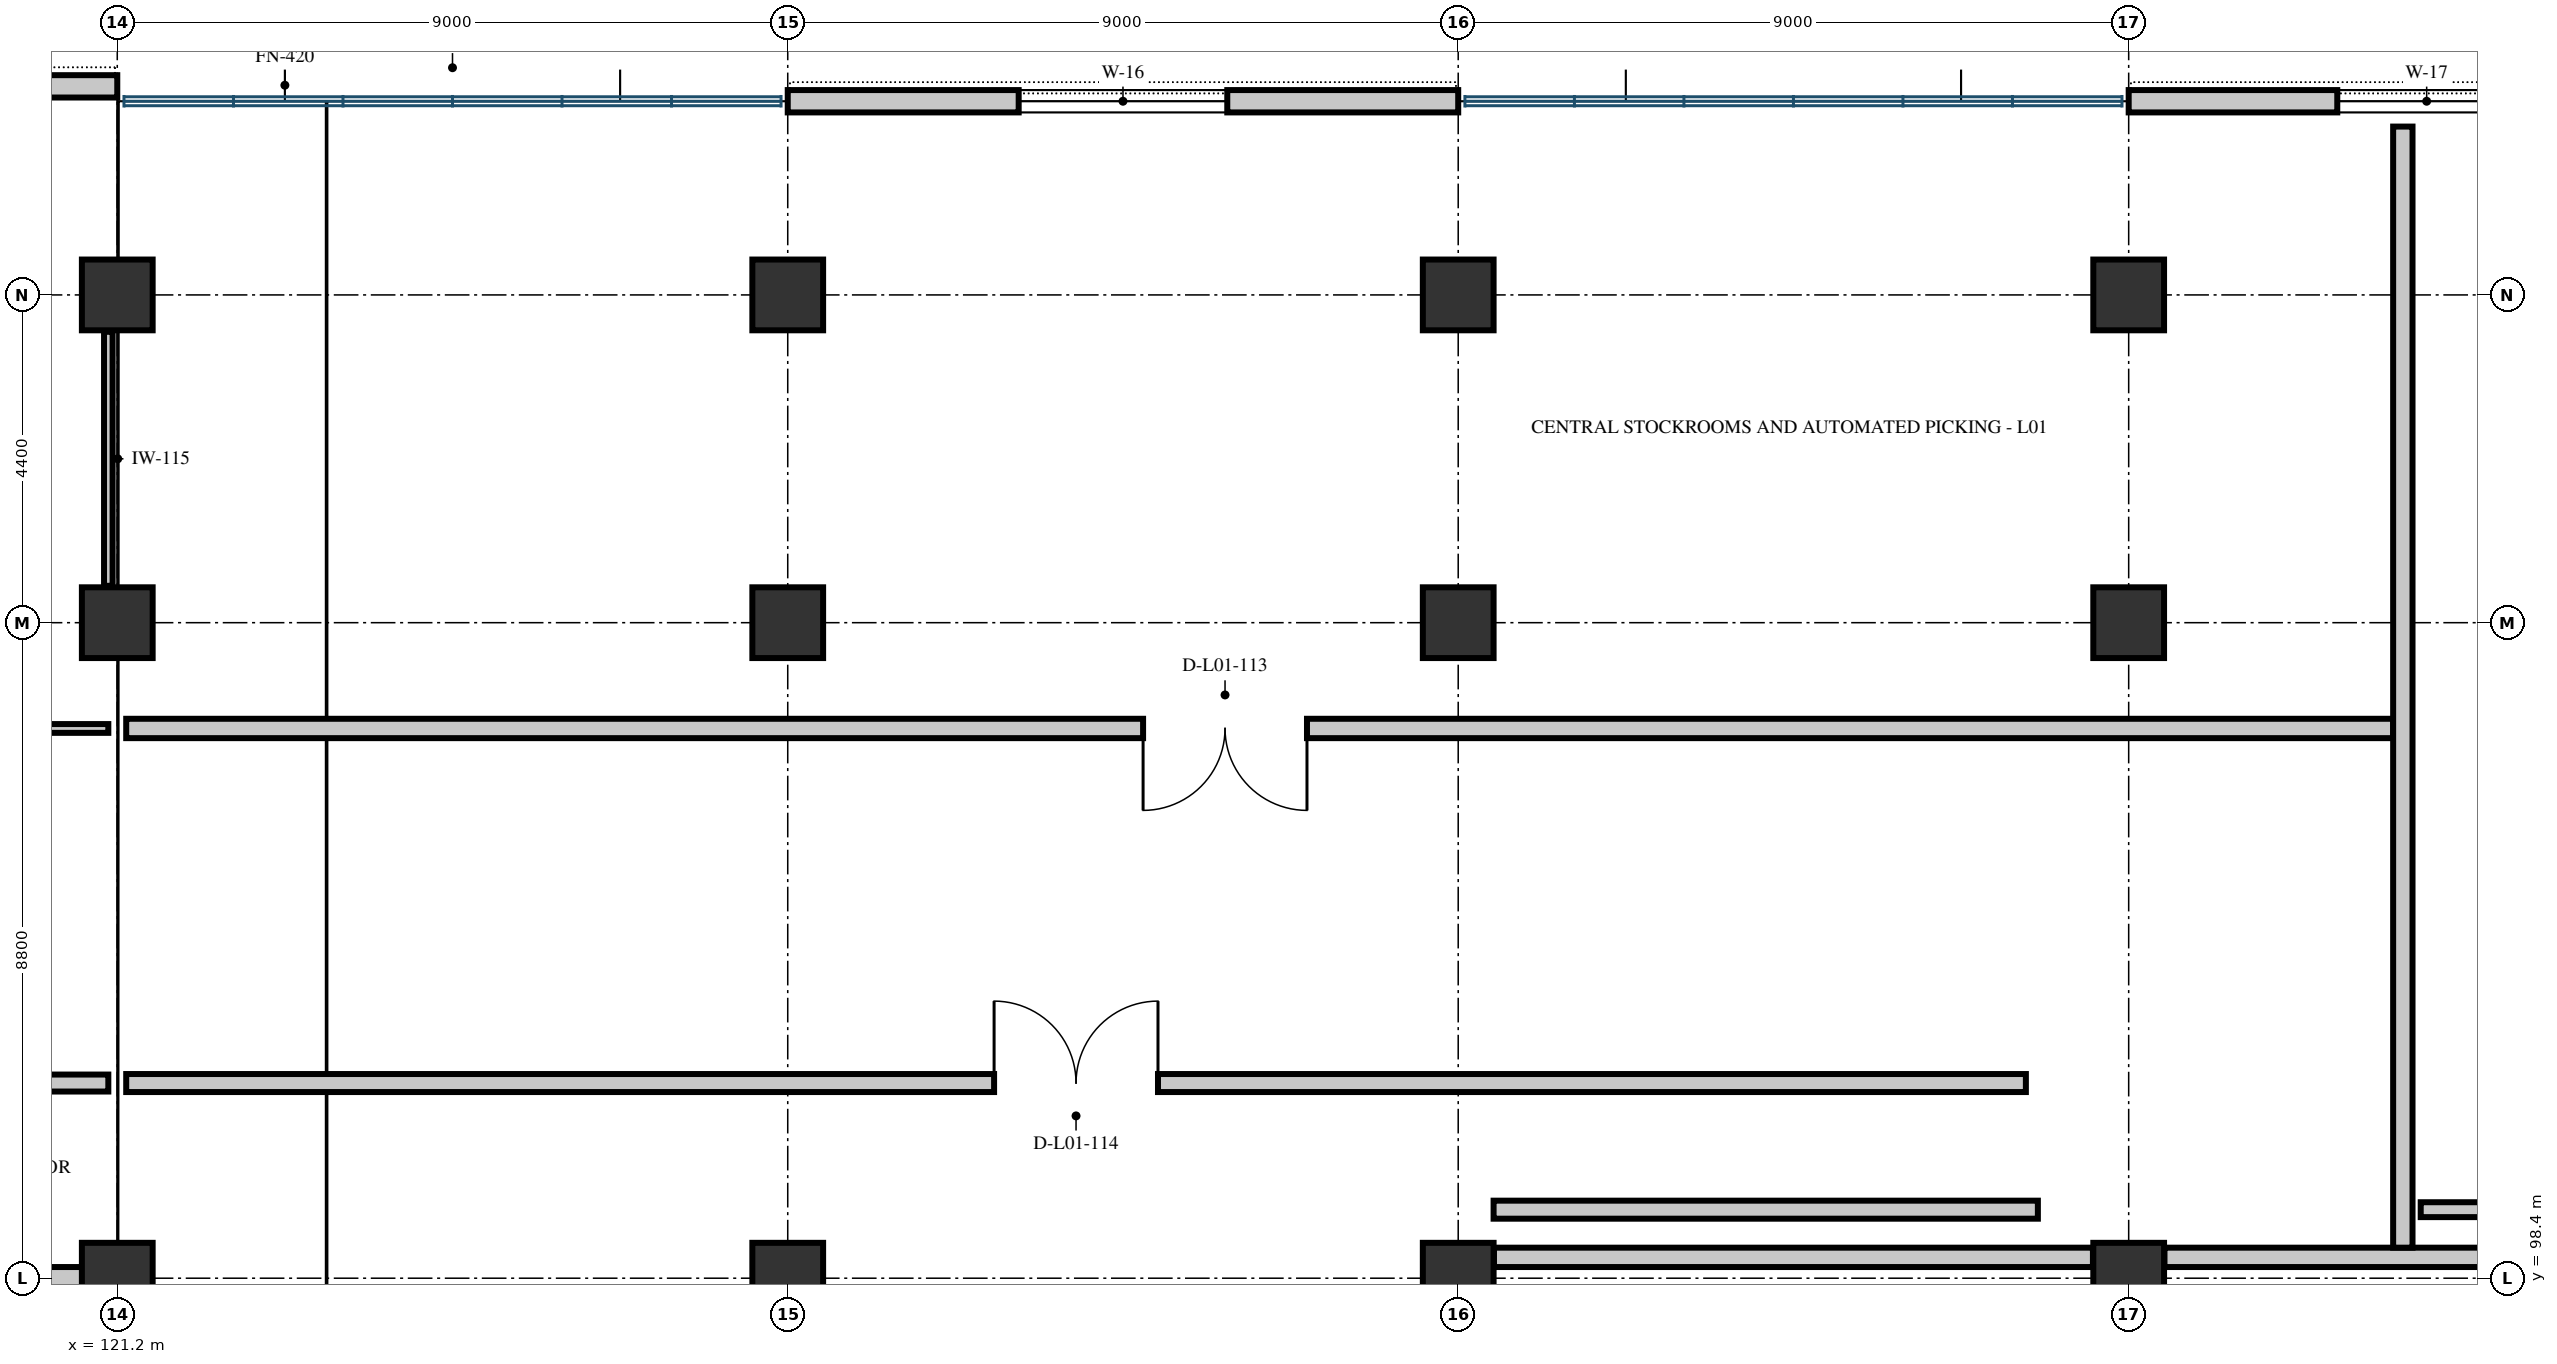
"""IFC4 building model, lengths in metres.
Left out: names, types, materials, properties, quantities, classifications, styles, units other than length and angle.
Written with IfcOpenShell. Run it as: python <this file> out.ifc"""

import sys

from ifc_helpers import new_model, si_unit, direction, frame, frame_2d, origin, origin_2d, place, context, subcontext, project, spatial, rectangle, extrude, element, fill, save


model = new_model("IFC4")
c1 = context("Model", 3, precision=1e-05, world=origin(), true_north=direction((0.0, 1.0)))
c2 = subcontext(c1, "Body", "Model", "MODEL_VIEW")
j1 = project(units=[si_unit("LENGTHUNIT", "METRE"), si_unit("PLANEANGLEUNIT", "RADIAN")], contexts=[c1])
p1 = place(None, origin())
s1 = spatial("IfcSite", under=j1, at=p1, CompositionType="ELEMENT")
p2 = place(p1, origin())
s2 = spatial("IfcBuilding", under=s1, at=p2, CompositionType="ELEMENT")
p3 = place(p2, frame((0.0, 0.0, 5.4)))
s3 = spatial("IfcBuildingStorey", under=s2, at=p3, CompositionType="ELEMENT", Elevation=5.4)
for number, where, z_axis, x_axis in (
    (1, (121.2, 98.4, 0.0), (0.0, 0.0, 1.0), (1.0, 0.0, 0.0)),
    (2, (121.2, 107.2, 0.0), (0.0, 0.0, 1.0), (1.0, 0.0, 0.0)),
    (3, (121.2, 111.6, 0.0), (0.0, 0.0, 1.0), (1.0, 0.0, 0.0)),
    (4, (130.2, 98.4, 0.0), (0.0, 0.0, 1.0), (1.0, 0.0, 0.0)),
    (5, (130.2, 107.2, 0.0), (0.0, 0.0, 1.0), (1.0, 0.0, 0.0)),
    (6, (130.2, 111.6, 0.0), (0.0, 0.0, 1.0), (1.0, 0.0, 0.0)),
    (7, (139.2, 98.4, 0.0), (0.0, 0.0, 1.0), (1.0, 0.0, 0.0)),
    (8, (139.2, 107.2, 0.0), (0.0, 0.0, 1.0), (1.0, 0.0, 0.0)),
    (9, (139.2, 111.6, 0.0), (0.0, 0.0, 1.0), (1.0, 0.0, 0.0)),
    (10, (148.2, 98.4, 0.0), (0.0, 0.0, 1.0), (1.0, 0.0, 0.0)),
    (11, (148.2, 107.2, 0.0), (0.0, 0.0, 1.0), (1.0, 0.0, 0.0)),
    (12, (148.2, 111.6, 0.0), (0.0, 0.0, 1.0), (1.0, 0.0, 0.0)),
):
    element("IfcColumn", number, at=place(p3, frame(where, z_axis=z_axis, x_axis=x_axis)), inside=s3, PredefinedType="COLUMN", context=c2, shape_type="SweptSolid", body=[
        extrude(rectangle(XDim=0.95, YDim=0.95, at=origin_2d()), origin(), (0.0, 0.0, 1.0), 4.8),
    ])
p4 = place(p3, frame((112.2, 114.4, 0.0), z_axis=(0.0, 0.0, 1.0), x_axis=(1.0, 0.0, 0.0)))
e13 = element("IfcWall", 13, at=p4, inside=s3, PredefinedType="SOLIDWALL", context=c2, shape_type="SweptSolid", body=[
    extrude(rectangle(XDim=9.0, YDim=0.3, at=frame_2d((4.5, 0.0))), origin(), (0.0, 0.0, 1.0), 4.505),
])
p5 = place(p4, frame((2.9, 0.0, 2.1)))
e14 = element("IfcOpeningElement", 14, at=p5, cuts=e13, PredefinedType="OPENING", context=c2, shape_type="SweptSolid", body=[
    extrude(rectangle(XDim=3.2, YDim=1.4, at=frame_2d((1.6, 0.7))), frame((0.0, 0.162, 0.0), z_axis=(0.0, -1.0, 0.0), x_axis=(1.0, 0.0, 0.0)), (0.0, 0.0, 1.0), 0.324),
])
p6 = place(p3, frame((130.2, 114.2, 0.0), z_axis=(0.0, 0.0, 1.0), x_axis=(1.0, 0.0, 0.0)))
e15 = element("IfcWall", 15, at=p6, inside=s3, PredefinedType="SOLIDWALL", context=c2, shape_type="SweptSolid", body=[
    extrude(rectangle(XDim=9.0, YDim=0.3, at=frame_2d((4.5, 0.0))), origin(), (0.0, 0.0, 1.0), 4.505),
])
p7 = place(p6, frame((3.1, 0.0, 2.15)))
e16 = element("IfcOpeningElement", 16, at=p7, cuts=e15, PredefinedType="OPENING", context=c2, shape_type="SweptSolid", body=[
    extrude(rectangle(XDim=2.8, YDim=1.3, at=frame_2d((1.4, 0.65))), frame((0.0, 0.162, 0.0), z_axis=(0.0, -1.0, 0.0), x_axis=(1.0, 0.0, 0.0)), (0.0, 0.0, 1.0), 0.324),
])
p8 = place(p3, frame((148.2, 114.2, 0.0), z_axis=(0.0, 0.0, 1.0), x_axis=(1.0, 0.0, 0.0)))
e17 = element("IfcWall", 17, at=p8, inside=s3, PredefinedType="SOLIDWALL", context=c2, shape_type="SweptSolid", body=[
    extrude(rectangle(XDim=8.0, YDim=0.3, at=frame_2d((4.0, 0.0))), origin(), (0.0, 0.0, 1.0), 4.505),
])
p9 = place(p8, frame((2.8, 0.0, 2.2)))
e18 = element("IfcOpeningElement", 18, at=p9, cuts=e17, PredefinedType="OPENING", context=c2, shape_type="SweptSolid", body=[
    extrude(rectangle(XDim=2.4, YDim=1.2, at=frame_2d((1.2, 0.6))), frame((0.0, 0.162, 0.0), z_axis=(0.0, -1.0, 0.0), x_axis=(1.0, 0.0, 0.0)), (0.0, 0.0, 1.0), 0.324),
])
p10 = place(p3, frame((120.727, 98.4, 0.0), z_axis=(0.0, 0.0, 1.0), x_axis=(-1.0, 0.0, 0.0)))
e19 = element("IfcWall", 19, at=p10, inside=s3, PredefinedType="SOLIDWALL", context=c2, shape_type="SweptSolid", body=[
    extrude(rectangle(XDim=8.054, YDim=0.3, at=frame_2d((4.027, 0.0))), origin(), (0.0, 0.0, 1.0), 3.445),
])
p11 = place(p10, frame((3.402, 0.0, 1.2)))
e20 = element("IfcOpeningElement", 20, at=p11, cuts=e19, PredefinedType="OPENING", context=c2, shape_type="SweptSolid", body=[
    extrude(rectangle(XDim=1.25, YDim=1.55, at=frame_2d((0.625, 0.775))), frame((0.0, 0.162, 0.0), z_axis=(0.0, -1.0, 0.0), x_axis=(1.0, 0.0, 0.0)), (0.0, 0.0, 1.0), 0.324),
])
for number, where, z_axis, x_axis in (
    (21, (139.68, 98.68, 0.0), (0.0, 0.0, 1.0), (1.0, 0.0, 0.0)),
    (22, (148.68, 98.68, 0.0), (0.0, 0.0, 1.0), (1.0, 0.0, 0.0)),
):
    element("IfcWall", number, at=place(p3, frame(where, z_axis=z_axis, x_axis=x_axis)), inside=s3, PredefinedType="PARTITIONING", context=c2, shape_type="SweptSolid", body=[
        extrude(rectangle(XDim=8.04, YDim=0.26, at=frame_2d((4.02, 0.0))), origin(), (0.0, 0.0, 1.0), 3.445),
    ])
p12 = place(p3, frame((121.08, 105.78, 0.0), z_axis=(0.0, 0.0, 1.0), x_axis=(-1.0, 0.0, 0.0)))
e23 = element("IfcWall", 23, at=p12, inside=s3, PredefinedType="PARTITIONING", context=c2, shape_type="SweptSolid", body=[
    extrude(rectangle(XDim=13.1, YDim=0.118, at=frame_2d((6.55, 0.0))), origin(), (0.0, 0.0, 1.0), 3.445),
])
p13 = place(p3, frame((121.08, 111.105, 0.0), z_axis=(0.0, 0.0, 1.0), x_axis=(0.0, -1.0, 0.0)))
e24 = element("IfcWall", 24, at=p13, inside=s3, PredefinedType="PARTITIONING", context=c2, shape_type="SweptSolid", body=[
    extrude(rectangle(XDim=3.41, YDim=0.115, at=frame_2d((1.705, 0.0))), origin(), (0.0, 0.0, 1.0), 3.445),
])
p14 = place(p3, frame((108.589, 101.02, 0.0), z_axis=(0.0, 0.0, 1.0), x_axis=(1.0, 0.0, 0.0)))
e25 = element("IfcWall", 25, at=p14, inside=s3, PredefinedType="PARTITIONING", context=c2, shape_type="SweptSolid", body=[
    extrude(rectangle(XDim=12.491, YDim=0.228, at=frame_2d((6.246, 0.0))), origin(), (0.0, 0.0, 1.0), 3.445),
])
p15 = place(p3, frame((151.75, 105.78, 0.0), z_axis=(0.0, 0.0, 1.0), x_axis=(-1.0, 0.0, 0.0)))
e26 = element("IfcWall", 26, at=p15, inside=s3, PredefinedType="PARTITIONING", context=c2, shape_type="SweptSolid", body=[
    extrude(rectangle(XDim=30.43, YDim=0.26, at=frame_2d((15.215, 0.0))), origin(), (0.0, 0.0, 1.0), 3.445),
])
p16 = place(p15, frame((14.58, 0.0, 0.0)))
e27 = element("IfcOpeningElement", 27, at=p16, cuts=e26, PredefinedType="OPENING", context=c2, shape_type="SweptSolid", body=[
    extrude(rectangle(XDim=2.2, YDim=2.5, at=frame_2d((1.1, 1.25))), frame((0.0, 0.142, 0.0), z_axis=(0.0, -1.0, 0.0), x_axis=(1.0, 0.0, 0.0)), (0.0, 0.0, 1.0), 0.284),
])
p17 = place(p3, frame((151.88, 113.86, 0.0), z_axis=(0.0, 0.0, 1.0), x_axis=(0.0, -1.0, 0.0)))
e28 = element("IfcWall", 28, at=p17, inside=s3, PredefinedType="PARTITIONING", context=c2, shape_type="SweptSolid", body=[
    extrude(rectangle(XDim=15.05, YDim=0.26, at=frame_2d((7.525, 0.0))), origin(), (0.0, 0.0, 1.0), 3.445),
])
p18 = place(p3, frame((121.32, 101.02, 0.0), z_axis=(0.0, 0.0, 1.0), x_axis=(1.0, 0.0, 0.0)))
e29 = element("IfcWall", 29, at=p18, inside=s3, PredefinedType="PARTITIONING", context=c2, shape_type="SweptSolid", body=[
    extrude(rectangle(XDim=25.5, YDim=0.242, at=frame_2d((12.75, 0.0))), origin(), (0.0, 0.0, 1.0), 3.445),
])
p19 = place(p18, frame((11.65, 0.0, 0.0)))
e30 = element("IfcOpeningElement", 30, at=p19, cuts=e29, PredefinedType="OPENING", context=c2, shape_type="SweptSolid", body=[
    extrude(rectangle(XDim=2.2, YDim=2.5, at=frame_2d((1.1, 1.25))), frame((0.0, 0.133, 0.0), z_axis=(0.0, -1.0, 0.0), x_axis=(1.0, 0.0, 0.0)), (0.0, 0.0, 1.0), 0.266),
])
p20 = place(p3, frame((146.981, 99.32, 0.0), z_axis=(0.0, 0.0, 1.0), x_axis=(-1.0, 0.0, 0.0)))
e31 = element("IfcWall", 31, at=p20, inside=s3, PredefinedType="PARTITIONING", context=c2, shape_type="SweptSolid", body=[
    extrude(rectangle(XDim=7.306, YDim=0.242, at=frame_2d((3.653, 0.0))), origin(), (0.0, 0.0, 1.0), 4.505),
])
p21 = place(p3, frame((156.28, 99.32, 0.0), z_axis=(0.0, 0.0, 1.0), x_axis=(-1.0, 0.0, 0.0)))
e32 = element("IfcWall", 32, at=p21, inside=s3, PredefinedType="PARTITIONING", context=c2, shape_type="SweptSolid", body=[
    extrude(rectangle(XDim=4.16, YDim=0.2, at=frame_2d((2.08, 0.0))), origin(), (0.0, 0.0, 1.0), 4.505),
])
p22 = place(p7, origin())
e33 = element("IfcWindow", 33, at=p22, inside=s3, PartitioningType="SINGLE_PANEL", PredefinedType="WINDOW", context=c2, shape_type="SweptSolid", body=[
    extrude(rectangle(XDim=2.8, YDim=1.3, at=frame_2d((1.4, 0.65))), frame((0.0, 0.03, 0.0), z_axis=(0.0, -1.0, 0.0), x_axis=(1.0, 0.0, 0.0)), (0.0, 0.0, 1.0), 0.06),
])
fill(e16, e33)
p23 = place(p9, origin())
e34 = element("IfcWindow", 34, at=p23, inside=s3, PartitioningType="SINGLE_PANEL", PredefinedType="WINDOW", context=c2, shape_type="SweptSolid", body=[
    extrude(rectangle(XDim=2.4, YDim=1.2, at=frame_2d((1.2, 0.6))), frame((0.0, 0.03, 0.0), z_axis=(0.0, -1.0, 0.0), x_axis=(1.0, 0.0, 0.0)), (0.0, 0.0, 1.0), 0.06),
])
fill(e18, e34)
p24 = place(p16, origin())
e35 = element("IfcDoor", 35, at=p24, inside=s3, OperationType="DOUBLE_DOOR_SINGLE_SWING", PredefinedType="DOOR", context=c2, shape_type="SweptSolid", body=[
    extrude(rectangle(XDim=2.2, YDim=2.5, at=frame_2d((1.1, 1.25))), frame((0.0, 0.025, 0.0), z_axis=(0.0, -1.0, 0.0), x_axis=(1.0, 0.0, 0.0)), (0.0, 0.0, 1.0), 0.05),
])
fill(e27, e35)
p25 = place(p19, origin())
e36 = element("IfcDoor", 36, at=p25, inside=s3, OperationType="DOUBLE_DOOR_SINGLE_SWING", PredefinedType="DOOR", context=c2, shape_type="SweptSolid", body=[
    extrude(rectangle(XDim=2.2, YDim=2.5, at=frame_2d((1.1, 1.25))), frame((0.0, 0.025, 0.0), z_axis=(0.0, -1.0, 0.0), x_axis=(1.0, 0.0, 0.0)), (0.0, 0.0, 1.0), 0.05),
])
fill(e30, e36)
save(model, sys.argv[1])
